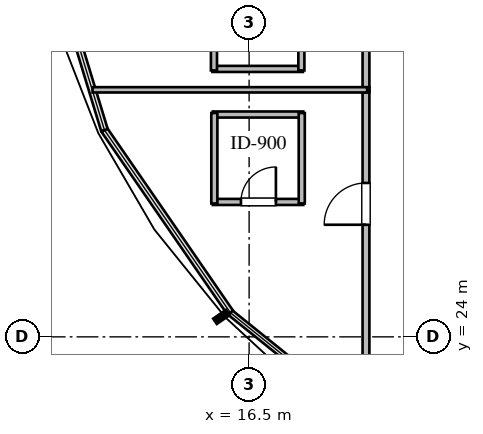
"""IFC4 building model, lengths in metres.
Left out: names, types, materials, properties, quantities, classifications, styles, units other than length and angle.
Written with IfcOpenShell. Run it as: python <this file> out.ifc"""

import sys

from ifc_helpers import new_model, si_unit, direction, frame, frame_2d, origin, place, context, subcontext, project, spatial, rectangle, extrude, element, fill, save


model = new_model("IFC4")
c1 = context("Model", 3, precision=1e-05, world=origin(), true_north=direction((0.0, 1.0)))
c2 = subcontext(c1, "Body", "Model", "MODEL_VIEW")
j1 = project(units=[si_unit("LENGTHUNIT", "METRE"), si_unit("PLANEANGLEUNIT", "RADIAN")], contexts=[c1])
p1 = place(None, origin())
s1 = spatial("IfcSite", under=j1, at=p1, CompositionType="ELEMENT")
p2 = place(p1, origin())
s2 = spatial("IfcBuilding", under=s1, at=p2, CompositionType="ELEMENT")
p3 = place(p2, frame((0.0, 0.0, 153.0)))
s3 = spatial("IfcBuildingStorey", under=s2, at=p3, CompositionType="ELEMENT", Elevation=153.0)
p4 = place(p3, frame((15.545, 27.55, 0.0), z_axis=(0.0, 0.0, 1.0), x_axis=(1.0, 0.0, 0.0)))
e1 = element("IfcWall", 1, at=p4, inside=s3, PredefinedType="PLUMBINGWALL", context=c2, shape_type="SweptSolid", body=[
    extrude(rectangle(XDim=2.38, YDim=0.16, at=frame_2d((1.19, 0.0))), origin(), (0.0, 0.0, 1.0), 3.36),
])
p5 = place(p4, frame((0.74, 0.0, 0.0)))
e2 = element("IfcOpeningElement", 2, at=p5, cuts=e1, PredefinedType="OPENING", context=c2, shape_type="SweptSolid", body=[
    extrude(rectangle(XDim=0.92, YDim=2.1, at=frame_2d((0.46, 1.05))), frame((0.0, 0.09, 0.0), z_axis=(0.0, -1.0, 0.0), x_axis=(1.0, 0.0, 0.0)), (0.0, 0.0, 1.0), 0.18),
])
p6 = place(p3, frame((15.545, 29.85, 0.0), z_axis=(0.0, 0.0, 1.0), x_axis=(1.0, 0.0, 0.0)))
e3 = element("IfcWall", 3, at=p6, inside=s3, PredefinedType="PLUMBINGWALL", context=c2, shape_type="SweptSolid", body=[
    extrude(rectangle(XDim=2.38, YDim=0.16, at=frame_2d((1.19, 0.0))), origin(), (0.0, 0.0, 1.0), 3.36),
])
for number, where, z_axis, x_axis in (
    (4, (15.585, 27.51, 0.0), (0.0, 0.0, 1.0), (0.0, 1.0, 0.0)),
    (5, (17.885, 27.51, 0.0), (0.0, 0.0, 1.0), (0.0, 1.0, 0.0)),
):
    element("IfcWall", number, at=place(p3, frame(where, z_axis=z_axis, x_axis=x_axis)), inside=s3, PredefinedType="PLUMBINGWALL", context=c2, shape_type="SweptSolid", body=[
        extrude(rectangle(XDim=2.38, YDim=0.16, at=frame_2d((1.19, 0.0))), origin(), (0.0, 0.0, 1.0), 3.36),
    ])
p7 = place(p3, frame((15.535, 31.05, 0.0), z_axis=(0.0, 0.0, 1.0), x_axis=(1.0, 0.0, 0.0)))
e6 = element("IfcWall", 6, at=p7, inside=s3, PredefinedType="PLUMBINGWALL", context=c2, shape_type="SweptSolid", body=[
    extrude(rectangle(XDim=2.38, YDim=0.16, at=frame_2d((1.19, 0.0))), origin(), (0.0, 0.0, 1.0), 3.36),
])
p8 = place(p3, frame((15.575, 31.01, 0.0), z_axis=(0.0, 0.0, 1.0), x_axis=(0.0, 1.0, 0.0)))
e7 = element("IfcWall", 7, at=p8, inside=s3, PredefinedType="PLUMBINGWALL", context=c2, shape_type="SweptSolid", body=[
    extrude(rectangle(XDim=2.38, YDim=0.16, at=frame_2d((1.19, 0.0))), origin(), (0.0, 0.0, 1.0), 3.36),
])
p9 = place(p8, frame((0.74, 0.0, 0.0)))
e8 = element("IfcOpeningElement", 8, at=p9, cuts=e7, PredefinedType="OPENING", context=c2, shape_type="SweptSolid", body=[
    extrude(rectangle(XDim=0.92, YDim=2.1, at=frame_2d((0.46, 1.05))), frame((0.0, 0.09, 0.0), z_axis=(0.0, -1.0, 0.0), x_axis=(1.0, 0.0, 0.0)), (0.0, 0.0, 1.0), 0.18),
])
p10 = place(p3, frame((17.875, 31.01, 0.0), z_axis=(0.0, 0.0, 1.0), x_axis=(0.0, 1.0, 0.0)))
e9 = element("IfcWall", 9, at=p10, inside=s3, PredefinedType="PLUMBINGWALL", context=c2, shape_type="SweptSolid", body=[
    extrude(rectangle(XDim=2.38, YDim=0.16, at=frame_2d((1.19, 0.0))), origin(), (0.0, 0.0, 1.0), 3.36),
])
p11 = place(p3, frame((19.575, 21.775, 0.0), z_axis=(0.0, 0.0, 1.0), x_axis=(0.0, 1.0, 0.0)))
e10 = element("IfcWall", 10, at=p11, inside=s3, PredefinedType="PARTITIONING", context=c2, shape_type="SweptSolid", body=[
    extrude(rectangle(XDim=8.79, YDim=0.18, at=frame_2d((4.395, 0.0))), origin(), (0.0, 0.0, 1.0), 2.657),
])
p12 = place(p11, frame((5.175, 0.0, 0.0)))
e11 = element("IfcOpeningElement", 11, at=p12, cuts=e10, PredefinedType="OPENING", context=c2, shape_type="SweptSolid", body=[
    extrude(rectangle(XDim=1.1, YDim=2.1, at=frame_2d((0.55, 1.05))), frame((0.0, 0.1, 0.0), z_axis=(0.0, -1.0, 0.0), x_axis=(1.0, 0.0, 0.0)), (0.0, 0.0, 1.0), 0.2),
])
p13 = place(p3, frame((19.575, 30.435, 0.0), z_axis=(0.0, 0.0, 1.0), x_axis=(0.0, 1.0, 0.0)))
e12 = element("IfcWall", 12, at=p13, inside=s3, PredefinedType="PARTITIONING", context=c2, shape_type="SweptSolid", body=[
    extrude(rectangle(XDim=5.13, YDim=0.18, at=frame_2d((2.565, 0.0))), origin(), (0.0, 0.0, 1.0), 2.657),
])
p14 = place(p13, frame((2.015, 0.0, 0.0)))
e13 = element("IfcOpeningElement", 13, at=p14, cuts=e12, PredefinedType="OPENING", context=c2, shape_type="SweptSolid", body=[
    extrude(rectangle(XDim=1.1, YDim=2.1, at=frame_2d((0.55, 1.05))), frame((0.0, 0.1, 0.0), z_axis=(0.0, -1.0, 0.0), x_axis=(1.0, 0.0, 0.0)), (0.0, 0.0, 1.0), 0.2),
])
p15 = place(p3, frame((12.381, 30.5, 0.0), z_axis=(0.0, 0.0, 1.0), x_axis=(1.0, 0.0, 0.0)))
e14 = element("IfcWall", 14, at=p15, inside=s3, PredefinedType="PARTITIONING", context=c2, shape_type="SweptSolid", body=[
    extrude(rectangle(XDim=7.224, YDim=0.14, at=frame_2d((3.612, 0.0))), origin(), (0.0, 0.0, 1.0), 3.36),
])
p16 = place(p5, origin())
e15 = element("IfcDoor", 15, at=p16, inside=s3, OperationType="SINGLE_SWING_RIGHT", PredefinedType="DOOR", context=c2, shape_type="SweptSolid", body=[
    extrude(rectangle(XDim=0.92, YDim=2.1, at=frame_2d((0.46, 1.05))), frame((0.0, 0.025, 0.0), z_axis=(0.0, -1.0, 0.0), x_axis=(1.0, 0.0, 0.0)), (0.0, 0.0, 1.0), 0.05),
])
fill(e2, e15)
p17 = place(p12, origin())
e16 = element("IfcDoor", 16, at=p17, inside=s3, OperationType="SINGLE_SWING_LEFT", PredefinedType="DOOR", context=c2, shape_type="SweptSolid", body=[
    extrude(rectangle(XDim=1.1, YDim=2.1, at=frame_2d((0.55, 1.05))), frame((0.0, 0.025, 0.0), z_axis=(0.0, -1.0, 0.0), x_axis=(1.0, 0.0, 0.0)), (0.0, 0.0, 1.0), 0.05),
])
fill(e11, e16)
save(model, sys.argv[1])
